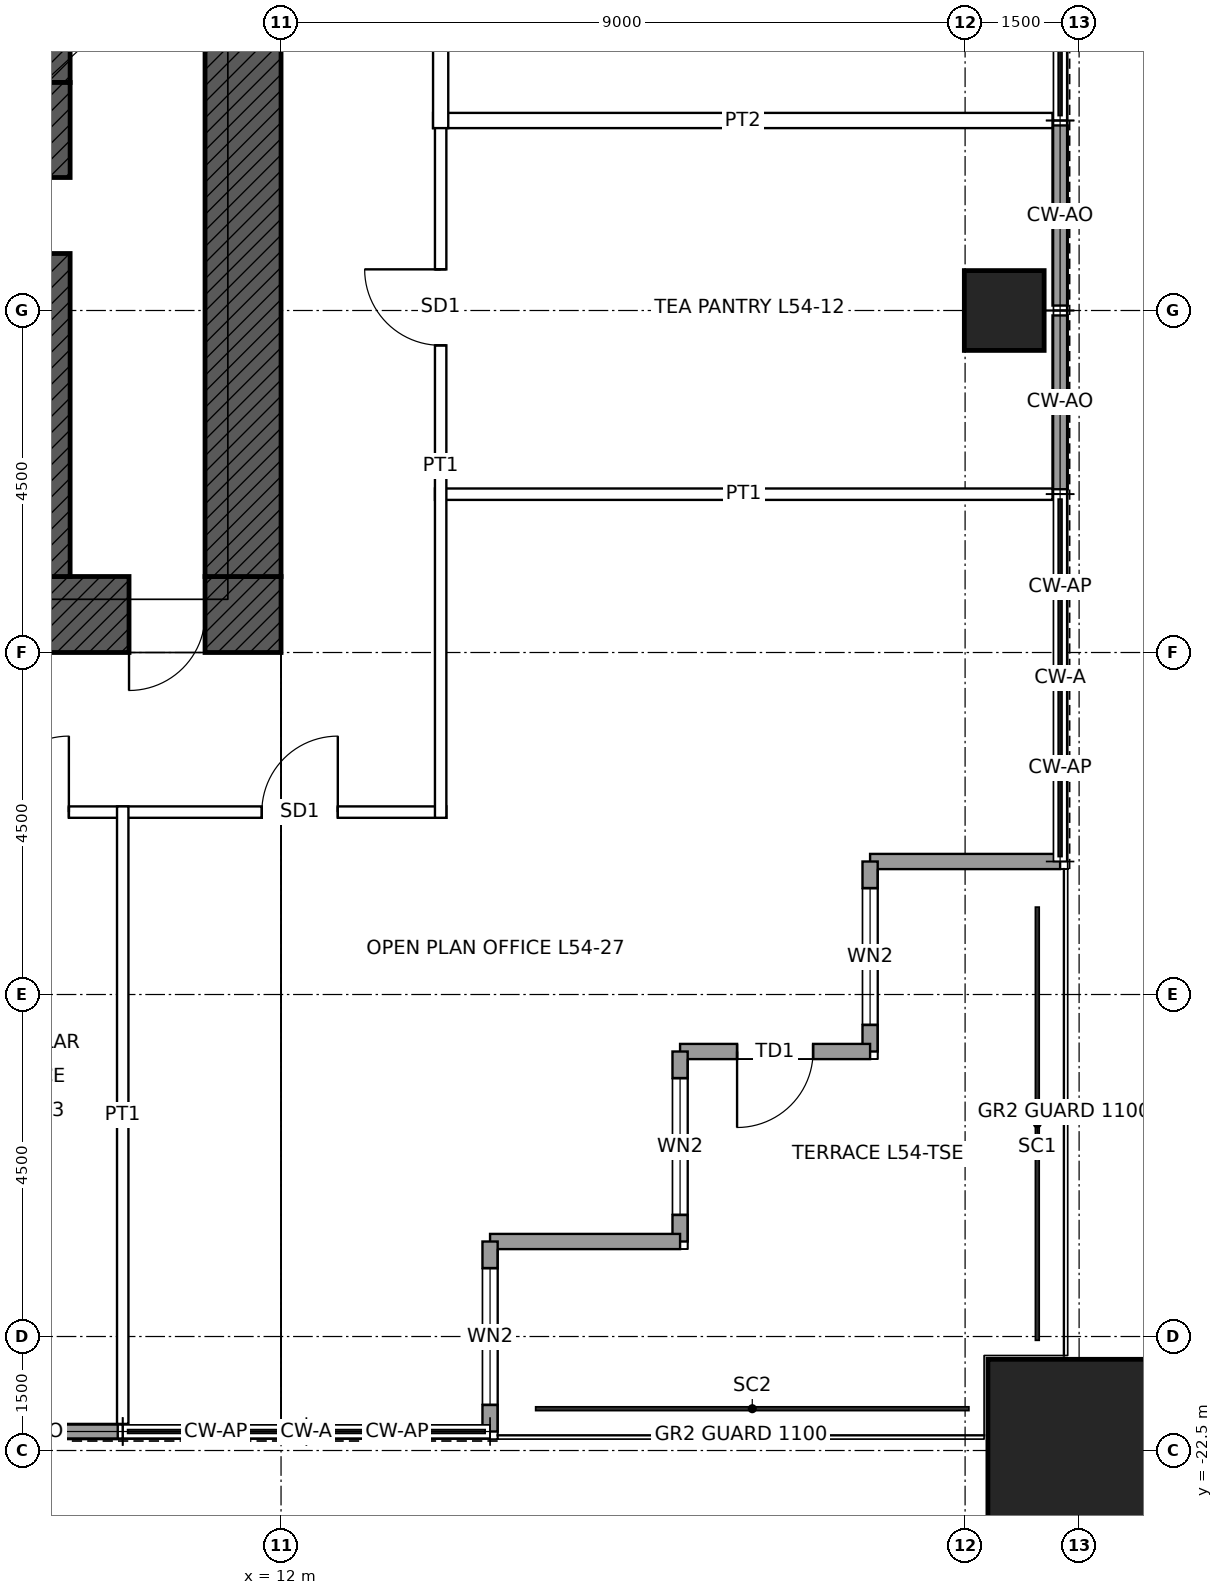
"""IFC4 building model, lengths in metres.
Left out: names, types, materials, properties, quantities, classifications, styles, units other than length and angle.
Written with IfcOpenShell. Run it as: python <this file> out.ifc"""

import sys

from ifc_helpers import new_model, si_unit, direction, frame, frame_2d, origin, origin_2d, place, context, subcontext, project, spatial, rectangle, hollow_rectangle, extrude, element, fill, save


model = new_model("IFC4")
c1 = context("Model", 3, precision=1e-05, world=origin(), true_north=direction((0.0, 1.0)))
c2 = subcontext(c1, "Body", "Model", "MODEL_VIEW")
j1 = project(units=[si_unit("LENGTHUNIT", "METRE"), si_unit("PLANEANGLEUNIT", "RADIAN")], contexts=[c1])
p1 = place(None, origin())
s1 = spatial("IfcSite", under=j1, at=p1, CompositionType="ELEMENT")
p2 = place(p1, origin())
s2 = spatial("IfcBuilding", under=s1, at=p2, CompositionType="ELEMENT")
p3 = place(p2, frame((0.0, 0.0, 249.9)))
s3 = spatial("IfcBuildingStorey", under=s2, at=p3, CompositionType="ELEMENT", Elevation=249.9)
p4 = place(p3, frame((22.5, -22.5, 0.0), z_axis=(0.0, 0.0, 1.0), x_axis=(1.0, 0.0, 0.0)))
e1 = element("IfcColumn", 1, at=p4, inside=s3, PredefinedType="COLUMN", context=c2, shape_type="SweptSolid", body=[
    extrude(hollow_rectangle(XDim=2.4, YDim=2.4, WallThickness=0.12, at=origin_2d()), origin(), (0.0, 0.0, 1.0), 4.0),
])
p5 = place(p3, frame((21.515, -7.5, 0.0), z_axis=(0.0, 0.0, 1.0), x_axis=(1.0, 0.0, 0.0)))
e2 = element("IfcColumn", 2, at=p5, inside=s3, PredefinedType="COLUMN", context=c2, shape_type="SweptSolid", body=[
    extrude(hollow_rectangle(XDim=1.05, YDim=1.05, WallThickness=0.07, at=origin_2d()), origin(), (0.0, 0.0, 1.0), 4.0),
])
p6 = place(p3, frame((12.0, -11.5, 0.0), z_axis=(0.0, 0.0, 1.0), x_axis=(-1.0, 0.0, 0.0)))
e3 = element("IfcWall", 3, at=p6, inside=s3, PredefinedType="SHEAR", context=c2, shape_type="SweptSolid", body=[
    extrude(rectangle(XDim=24.0, YDim=1.0, at=frame_2d((12.0, 0.0))), origin(), (0.0, 0.0, 1.0), 4.0),
])
p7 = place(p6, frame((11.5, 0.0, 0.0)))
e4 = element("IfcOpeningElement", 4, at=p7, cuts=e3, PredefinedType="OPENING", context=c2, shape_type="SweptSolid", body=[
    extrude(rectangle(XDim=1.0, YDim=2.1, at=frame_2d((0.5, 1.05))), frame((0.0, 0.51, 0.0), z_axis=(0.0, -1.0, 0.0), x_axis=(1.0, 0.0, 0.0)), (0.0, 0.0, 1.0), 1.02),
])
p8 = place(p6, frame((1.0, 0.0, 0.0)))
e5 = element("IfcOpeningElement", 5, at=p8, cuts=e3, PredefinedType="OPENING", context=c2, shape_type="SweptSolid", body=[
    extrude(rectangle(XDim=1.0, YDim=2.4, at=frame_2d((0.5, 1.2))), frame((0.0, 0.51, 0.0), z_axis=(0.0, -1.0, 0.0), x_axis=(1.0, 0.0, 0.0)), (0.0, 0.0, 1.0), 1.02),
])
p9 = place(p3, frame((11.5, 11.0, 0.0), z_axis=(0.0, 0.0, 1.0), x_axis=(0.0, -1.0, 0.0)))
e6 = element("IfcWall", 6, at=p9, inside=s3, PredefinedType="SHEAR", context=c2, shape_type="SweptSolid", body=[
    extrude(rectangle(XDim=22.0, YDim=1.0, at=frame_2d((11.0, 0.0))), origin(), (0.0, 0.0, 1.0), 4.0),
])
p10 = place(p9, frame((10.5, 0.0, 0.0)))
e7 = element("IfcOpeningElement", 7, at=p10, cuts=e6, PredefinedType="OPENING", context=c2, shape_type="SweptSolid", body=[
    extrude(rectangle(XDim=1.0, YDim=2.4, at=frame_2d((0.5, 1.2))), frame((0.0, 0.51, 0.0), z_axis=(0.0, -1.0, 0.0), x_axis=(1.0, 0.0, 0.0)), (0.0, 0.0, 1.0), 1.02),
])
p11 = place(p3, frame((-9.0, -4.5, 0.0), z_axis=(0.0, 0.0, 1.0), x_axis=(1.0, 0.0, 0.0)))
e8 = element("IfcWall", 8, at=p11, inside=s3, PredefinedType="SHEAR", context=c2, shape_type="SweptSolid", body=[
    extrude(rectangle(XDim=18.0, YDim=0.45, at=frame_2d((9.0, 0.0))), origin(), (0.0, 0.0, 1.0), 4.0),
])
p12 = place(p3, frame((9.0, -4.5, 0.0), z_axis=(0.0, 0.0, 1.0), x_axis=(0.0, 1.0, 0.0)))
e9 = element("IfcWall", 9, at=p12, inside=s3, PredefinedType="SHEAR", context=c2, shape_type="SweptSolid", body=[
    extrude(rectangle(XDim=3.0, YDim=0.45, at=frame_2d((1.5, 0.0))), origin(), (0.0, 0.0, 1.0), 4.0),
])
p13 = place(p3, frame((9.0, -11.0, 0.0), z_axis=(0.0, 0.0, 1.0), x_axis=(0.0, 1.0, 0.0)))
e10 = element("IfcWall", 10, at=p13, inside=s3, PredefinedType="SHEAR", context=c2, shape_type="SweptSolid", body=[
    extrude(rectangle(XDim=6.5, YDim=0.45, at=frame_2d((3.25, 0.0))), origin(), (0.0, 0.0, 1.0), 4.0),
])
p14 = place(p13, frame((4.25, 0.0, 0.0)))
e11 = element("IfcOpeningElement", 11, at=p14, cuts=e10, PredefinedType="OPENING", context=c2, shape_type="SweptSolid", body=[
    extrude(rectangle(XDim=1.0, YDim=2.1, at=frame_2d((0.5, 1.05))), frame((0.0, 0.235, 0.0), z_axis=(0.0, -1.0, 0.0), x_axis=(1.0, 0.0, 0.0)), (0.0, 0.0, 1.0), 0.47),
])
p15 = place(p3, frame((22.25, -14.75, 0.0), z_axis=(0.0, 0.0, 1.0), x_axis=(-1.0, 0.0, 0.0)))
e12 = element("IfcWall", 12, at=p15, inside=s3, PredefinedType="SOLIDWALL", context=c2, shape_type="SweptSolid", body=[
    extrude(rectangle(XDim=2.5, YDim=0.2, at=frame_2d((1.25, 0.0))), origin(), (0.0, 0.0, 1.0), 3.75),
])
p16 = place(p3, frame((19.75, -14.75, 0.0), z_axis=(0.0, 0.0, 1.0), x_axis=(0.0, -1.0, 0.0)))
e13 = element("IfcWall", 13, at=p16, inside=s3, PredefinedType="SOLIDWALL", context=c2, shape_type="SweptSolid", body=[
    extrude(rectangle(XDim=2.5, YDim=0.2, at=frame_2d((1.25, 0.0))), origin(), (0.0, 0.0, 1.0), 3.75),
])
p17 = place(p16, frame((0.35, 0.0, 0.3)))
e14 = element("IfcOpeningElement", 14, at=p17, cuts=e13, PredefinedType="OPENING", context=c2, shape_type="SweptSolid", body=[
    extrude(rectangle(XDim=1.8, YDim=2.4, at=frame_2d((0.9, 1.2))), frame((0.0, 0.11, 0.0), z_axis=(0.0, -1.0, 0.0), x_axis=(1.0, 0.0, 0.0)), (0.0, 0.0, 1.0), 0.22),
])
p18 = place(p3, frame((19.75, -17.25, 0.0), z_axis=(0.0, 0.0, 1.0), x_axis=(-1.0, 0.0, 0.0)))
e15 = element("IfcWall", 15, at=p18, inside=s3, PredefinedType="SOLIDWALL", context=c2, shape_type="SweptSolid", body=[
    extrude(rectangle(XDim=2.5, YDim=0.2, at=frame_2d((1.25, 0.0))), origin(), (0.0, 0.0, 1.0), 3.75),
])
p19 = place(p18, frame((0.75, 0.0, 0.0)))
e16 = element("IfcOpeningElement", 16, at=p19, cuts=e15, PredefinedType="OPENING", context=c2, shape_type="SweptSolid", body=[
    extrude(rectangle(XDim=1.0, YDim=2.4, at=frame_2d((0.5, 1.2))), frame((0.0, 0.11, 0.0), z_axis=(0.0, -1.0, 0.0), x_axis=(1.0, 0.0, 0.0)), (0.0, 0.0, 1.0), 0.22),
])
p20 = place(p3, frame((17.25, -17.25, 0.0), z_axis=(0.0, 0.0, 1.0), x_axis=(0.0, -1.0, 0.0)))
e17 = element("IfcWall", 17, at=p20, inside=s3, PredefinedType="SOLIDWALL", context=c2, shape_type="SweptSolid", body=[
    extrude(rectangle(XDim=2.5, YDim=0.2, at=frame_2d((1.25, 0.0))), origin(), (0.0, 0.0, 1.0), 3.75),
])
p21 = place(p20, frame((0.35, 0.0, 0.3)))
e18 = element("IfcOpeningElement", 18, at=p21, cuts=e17, PredefinedType="OPENING", context=c2, shape_type="SweptSolid", body=[
    extrude(rectangle(XDim=1.8, YDim=2.4, at=frame_2d((0.9, 1.2))), frame((0.0, 0.11, 0.0), z_axis=(0.0, -1.0, 0.0), x_axis=(1.0, 0.0, 0.0)), (0.0, 0.0, 1.0), 0.22),
])
p22 = place(p3, frame((17.25, -19.75, 0.0), z_axis=(0.0, 0.0, 1.0), x_axis=(-1.0, 0.0, 0.0)))
e19 = element("IfcWall", 19, at=p22, inside=s3, PredefinedType="SOLIDWALL", context=c2, shape_type="SweptSolid", body=[
    extrude(rectangle(XDim=2.5, YDim=0.2, at=frame_2d((1.25, 0.0))), origin(), (0.0, 0.0, 1.0), 3.75),
])
p23 = place(p3, frame((14.75, -19.75, 0.0), z_axis=(0.0, 0.0, 1.0), x_axis=(0.0, -1.0, 0.0)))
e20 = element("IfcWall", 20, at=p23, inside=s3, PredefinedType="SOLIDWALL", context=c2, shape_type="SweptSolid", body=[
    extrude(rectangle(XDim=2.5, YDim=0.2, at=frame_2d((1.25, 0.0))), origin(), (0.0, 0.0, 1.0), 3.75),
])
p24 = place(p23, frame((0.35, 0.0, 0.3)))
e21 = element("IfcOpeningElement", 21, at=p24, cuts=e20, PredefinedType="OPENING", context=c2, shape_type="SweptSolid", body=[
    extrude(rectangle(XDim=1.8, YDim=2.4, at=frame_2d((0.9, 1.2))), frame((0.0, 0.11, 0.0), z_axis=(0.0, -1.0, 0.0), x_axis=(1.0, 0.0, 0.0)), (0.0, 0.0, 1.0), 0.22),
])
p25 = place(p3, frame((22.25, -5.065, 0.0), z_axis=(0.0, 0.0, 1.0), x_axis=(0.0, -1.0, 0.0)))
e22 = element("IfcWall", 22, at=p25, inside=s3, PredefinedType="SOLIDWALL", context=c2, shape_type="SweptSolid", body=[
    extrude(rectangle(XDim=2.37, YDim=0.2, at=frame_2d((1.185, 0.0))), origin(), (0.0, 0.0, 1.0), 3.75),
])
for number, where, z_axis, x_axis in (
    (23, (22.25, -7.565, 0.0), (0.0, 0.0, 1.0), (0.0, -1.0, 0.0)),
    (24, (9.852, -22.25, 0.0), (0.0, 0.0, 1.0), (-1.0, 0.0, 0.0)),
):
    element("IfcWall", number, at=place(p3, frame(where, z_axis=z_axis, x_axis=x_axis)), inside=s3, PredefinedType="SOLIDWALL", context=c2, shape_type="SweptSolid", body=[
        extrude(rectangle(XDim=2.287, YDim=0.2, at=frame_2d((1.144, 0.0))), origin(), (0.0, 0.0, 1.0), 3.75),
    ])
p26 = place(p3, frame((-14.175, -14.1, 0.0), z_axis=(0.0, 0.0, 1.0), x_axis=(1.0, 0.0, 0.0)))
e25 = element("IfcWall", 25, at=p26, inside=s3, PredefinedType="PARTITIONING", context=c2, shape_type="SweptSolid", body=[
    extrude(rectangle(XDim=28.35, YDim=0.15, at=frame_2d((14.175, 0.0))), origin(), (0.0, 0.0, 1.0), 3.75),
])
p27 = place(p26, frame((22.384, 0.0, 0.0)))
e26 = element("IfcOpeningElement", 26, at=p27, cuts=e25, PredefinedType="OPENING", context=c2, shape_type="SweptSolid", body=[
    extrude(rectangle(XDim=1.0, YDim=2.4, at=frame_2d((0.5, 1.2))), frame((0.0, 0.085, 0.0), z_axis=(0.0, -1.0, 0.0), x_axis=(1.0, 0.0, 0.0)), (0.0, 0.0, 1.0), 0.17),
])
p28 = place(p26, frame((19.925, 0.0, 0.0)))
e27 = element("IfcOpeningElement", 27, at=p28, cuts=e25, PredefinedType="OPENING", context=c2, shape_type="SweptSolid", body=[
    extrude(rectangle(XDim=1.0, YDim=2.4, at=frame_2d((0.5, 1.2))), frame((0.0, 0.085, 0.0), z_axis=(0.0, -1.0, 0.0), x_axis=(1.0, 0.0, 0.0)), (0.0, 0.0, 1.0), 0.17),
])
p29 = place(p26, frame((17.425, 0.0, 0.0)))
e28 = element("IfcOpeningElement", 28, at=p29, cuts=e25, PredefinedType="OPENING", context=c2, shape_type="SweptSolid", body=[
    extrude(rectangle(XDim=1.0, YDim=2.4, at=frame_2d((0.5, 1.2))), frame((0.0, 0.085, 0.0), z_axis=(0.0, -1.0, 0.0), x_axis=(1.0, 0.0, 0.0)), (0.0, 0.0, 1.0), 0.17),
])
p30 = place(p26, frame((15.275, 0.0, 0.0)))
e29 = element("IfcOpeningElement", 29, at=p30, cuts=e25, PredefinedType="OPENING", context=c2, shape_type="SweptSolid", body=[
    extrude(rectangle(XDim=1.0, YDim=2.4, at=frame_2d((0.5, 1.2))), frame((0.0, 0.085, 0.0), z_axis=(0.0, -1.0, 0.0), x_axis=(1.0, 0.0, 0.0)), (0.0, 0.0, 1.0), 0.17),
])
p31 = place(p26, frame((11.175, 0.0, 0.0)))
e30 = element("IfcOpeningElement", 30, at=p31, cuts=e25, PredefinedType="OPENING", context=c2, shape_type="SweptSolid", body=[
    extrude(rectangle(XDim=1.0, YDim=2.4, at=frame_2d((0.5, 1.2))), frame((0.0, 0.085, 0.0), z_axis=(0.0, -1.0, 0.0), x_axis=(1.0, 0.0, 0.0)), (0.0, 0.0, 1.0), 0.17),
])
p32 = place(p26, frame((7.425, 0.0, 0.0)))
e31 = element("IfcOpeningElement", 31, at=p32, cuts=e25, PredefinedType="OPENING", context=c2, shape_type="SweptSolid", body=[
    extrude(rectangle(XDim=1.0, YDim=2.4, at=frame_2d((0.5, 1.2))), frame((0.0, 0.085, 0.0), z_axis=(0.0, -1.0, 0.0), x_axis=(1.0, 0.0, 0.0)), (0.0, 0.0, 1.0), 0.17),
])
p33 = place(p26, frame((4.967, 0.0, 0.0)))
e32 = element("IfcOpeningElement", 32, at=p33, cuts=e25, PredefinedType="OPENING", context=c2, shape_type="SweptSolid", body=[
    extrude(rectangle(XDim=1.0, YDim=2.4, at=frame_2d((0.5, 1.2))), frame((0.0, 0.085, 0.0), z_axis=(0.0, -1.0, 0.0), x_axis=(1.0, 0.0, 0.0)), (0.0, 0.0, 1.0), 0.17),
])
p34 = place(p26, frame((25.922, 0.0, 0.0)))
e33 = element("IfcOpeningElement", 33, at=p34, cuts=e25, PredefinedType="OPENING", context=c2, shape_type="SweptSolid", body=[
    extrude(rectangle(XDim=1.0, YDim=2.4, at=frame_2d((0.5, 1.2))), frame((0.0, 0.085, 0.0), z_axis=(0.0, -1.0, 0.0), x_axis=(1.0, 0.0, 0.0)), (0.0, 0.0, 1.0), 0.17),
])
p35 = place(p26, frame((1.667, 0.0, 0.0)))
e34 = element("IfcOpeningElement", 34, at=p35, cuts=e25, PredefinedType="OPENING", context=c2, shape_type="SweptSolid", body=[
    extrude(rectangle(XDim=1.0, YDim=2.4, at=frame_2d((0.5, 1.2))), frame((0.0, 0.085, 0.0), z_axis=(0.0, -1.0, 0.0), x_axis=(1.0, 0.0, 0.0)), (0.0, 0.0, 1.0), 0.17),
])
p36 = place(p3, frame((14.025, -9.917, 0.0), z_axis=(0.0, 0.0, 1.0), x_axis=(1.0, 0.0, 0.0)))
e35 = element("IfcWall", 35, at=p36, inside=s3, PredefinedType="PARTITIONING", context=c2, shape_type="SweptSolid", body=[
    extrude(rectangle(XDim=8.125, YDim=0.15, at=frame_2d((4.062, 0.0))), origin(), (0.0, 0.0, 1.0), 3.75),
])
p37 = place(p3, frame((14.0, -5.0, 0.0), z_axis=(0.0, 0.0, 1.0), x_axis=(1.0, 0.0, 0.0)))
e36 = element("IfcWall", 36, at=p37, inside=s3, PredefinedType="PARTITIONING", context=c2, shape_type="SweptSolid", body=[
    extrude(rectangle(XDim=8.15, YDim=0.2, at=frame_2d((4.075, 0.0))), origin(), (0.0, 0.0, 1.0), 3.75),
])
p38 = place(p3, frame((9.917, -22.15, 0.0), z_axis=(0.0, 0.0, 1.0), x_axis=(0.0, 1.0, 0.0)))
e37 = element("IfcWall", 37, at=p38, inside=s3, PredefinedType="PARTITIONING", context=c2, shape_type="SweptSolid", body=[
    extrude(rectangle(XDim=8.125, YDim=0.15, at=frame_2d((4.062, 0.0))), origin(), (0.0, 0.0, 1.0), 3.75),
])
p39 = place(p3, frame((14.1, -14.175, 0.0), z_axis=(0.0, 0.0, 1.0), x_axis=(0.0, 1.0, 0.0)))
e38 = element("IfcWall", 38, at=p39, inside=s3, PredefinedType="PARTITIONING", context=c2, shape_type="SweptSolid", body=[
    extrude(rectangle(XDim=9.25, YDim=0.15, at=frame_2d((4.625, 0.0))), origin(), (0.0, 0.0, 1.0), 3.75),
])
p40 = place(p39, frame((6.217, 0.0, 0.0)))
e39 = element("IfcOpeningElement", 39, at=p40, cuts=e38, PredefinedType="OPENING", context=c2, shape_type="SweptSolid", body=[
    extrude(rectangle(XDim=1.0, YDim=2.4, at=frame_2d((0.5, 1.2))), frame((0.0, 0.085, 0.0), z_axis=(0.0, -1.0, 0.0), x_axis=(1.0, 0.0, 0.0)), (0.0, 0.0, 1.0), 0.17),
])
p41 = place(p3, frame((14.1, -5.1, 0.0), z_axis=(0.0, 0.0, 1.0), x_axis=(0.0, 1.0, 0.0)))
e40 = element("IfcWall", 40, at=p41, inside=s3, PredefinedType="PARTITIONING", context=c2, shape_type="SweptSolid", body=[
    extrude(rectangle(XDim=15.117, YDim=0.2, at=frame_2d((7.559, 0.0))), origin(), (0.0, 0.0, 1.0), 3.75),
])
p42 = place(p41, frame((12.059, 0.0, 0.0)))
e41 = element("IfcOpeningElement", 41, at=p42, cuts=e40, PredefinedType="OPENING", context=c2, shape_type="SweptSolid", body=[
    extrude(rectangle(XDim=1.0, YDim=2.4, at=frame_2d((0.5, 1.2))), frame((0.0, 0.11, 0.0), z_axis=(0.0, -1.0, 0.0), x_axis=(1.0, 0.0, 0.0)), (0.0, 0.0, 1.0), 0.22),
])
p43 = place(p41, frame((7.1, 0.0, 0.0)))
e42 = element("IfcOpeningElement", 42, at=p43, cuts=e40, PredefinedType="OPENING", context=c2, shape_type="SweptSolid", body=[
    extrude(rectangle(XDim=1.0, YDim=2.4, at=frame_2d((0.5, 1.2))), frame((0.0, 0.11, 0.0), z_axis=(0.0, -1.0, 0.0), x_axis=(1.0, 0.0, 0.0)), (0.0, 0.0, 1.0), 0.22),
])
p44 = place(p41, frame((2.1, 0.0, 0.0)))
e43 = element("IfcOpeningElement", 43, at=p44, cuts=e40, PredefinedType="OPENING", context=c2, shape_type="SweptSolid", body=[
    extrude(rectangle(XDim=1.0, YDim=2.4, at=frame_2d((0.5, 1.2))), frame((0.0, 0.11, 0.0), z_axis=(0.0, -1.0, 0.0), x_axis=(1.0, 0.0, 0.0)), (0.0, 0.0, 1.0), 0.22),
])
p45 = place(p17, origin())
e44 = element("IfcWindow", 44, at=p45, inside=s3, PartitioningType="SINGLE_PANEL", PredefinedType="WINDOW", context=c2, shape_type="SweptSolid", body=[
    extrude(rectangle(XDim=1.8, YDim=2.4, at=frame_2d((0.9, 1.2))), frame((0.0, 0.03, 0.0), z_axis=(0.0, -1.0, 0.0), x_axis=(1.0, 0.0, 0.0)), (0.0, 0.0, 1.0), 0.06),
])
fill(e14, e44)
p46 = place(p19, origin())
e45 = element("IfcDoor", 45, at=p46, inside=s3, OperationType="SINGLE_SWING_RIGHT", PredefinedType="DOOR", context=c2, shape_type="SweptSolid", body=[
    extrude(rectangle(XDim=1.0, YDim=2.4, at=frame_2d((0.5, 1.2))), frame((0.0, 0.025, 0.0), z_axis=(0.0, -1.0, 0.0), x_axis=(1.0, 0.0, 0.0)), (0.0, 0.0, 1.0), 0.05),
])
fill(e16, e45)
p47 = place(p21, origin())
e46 = element("IfcWindow", 46, at=p47, inside=s3, PartitioningType="SINGLE_PANEL", PredefinedType="WINDOW", context=c2, shape_type="SweptSolid", body=[
    extrude(rectangle(XDim=1.8, YDim=2.4, at=frame_2d((0.9, 1.2))), frame((0.0, 0.03, 0.0), z_axis=(0.0, -1.0, 0.0), x_axis=(1.0, 0.0, 0.0)), (0.0, 0.0, 1.0), 0.06),
])
fill(e18, e46)
p48 = place(p24, origin())
e47 = element("IfcWindow", 47, at=p48, inside=s3, PartitioningType="SINGLE_PANEL", PredefinedType="WINDOW", context=c2, shape_type="SweptSolid", body=[
    extrude(rectangle(XDim=1.8, YDim=2.4, at=frame_2d((0.9, 1.2))), frame((0.0, 0.03, 0.0), z_axis=(0.0, -1.0, 0.0), x_axis=(1.0, 0.0, 0.0)), (0.0, 0.0, 1.0), 0.06),
])
fill(e21, e47)
p49 = place(p8, origin())
e48 = element("IfcDoor", 48, at=p49, inside=s3, OperationType="SINGLE_SWING_RIGHT", PredefinedType="DOOR", context=c2, shape_type="SweptSolid", body=[
    extrude(rectangle(XDim=1.0, YDim=2.4, at=frame_2d((0.5, 1.2))), frame((0.0, 0.485, 0.0), z_axis=(0.0, -1.0, 0.0), x_axis=(1.0, 0.0, 0.0)), (0.0, 0.0, 1.0), 0.05),
])
fill(e5, e48)
p50 = place(p14, origin())
e49 = element("IfcDoor", 49, at=p50, inside=s3, OperationType="SINGLE_SWING_LEFT", PredefinedType="DOOR", context=c2, shape_type="SweptSolid", body=[
    extrude(rectangle(XDim=1.0, YDim=2.1, at=frame_2d((0.5, 1.05))), frame((0.0, 0.025, 0.0), z_axis=(0.0, -1.0, 0.0), x_axis=(1.0, 0.0, 0.0)), (0.0, 0.0, 1.0), 0.05),
])
fill(e11, e49)
p51 = place(p40, origin())
e50 = element("IfcDoor", 50, at=p51, inside=s3, OperationType="SINGLE_SWING_RIGHT", PredefinedType="DOOR", context=c2, shape_type="SweptSolid", body=[
    extrude(rectangle(XDim=1.0, YDim=2.4, at=frame_2d((0.5, 1.2))), frame((0.0, 0.025, 0.0), z_axis=(0.0, -1.0, 0.0), x_axis=(1.0, 0.0, 0.0)), (0.0, 0.0, 1.0), 0.05),
])
fill(e39, e50)
p52 = place(p27, origin())
e51 = element("IfcDoor", 51, at=p52, inside=s3, OperationType="SINGLE_SWING_RIGHT", PredefinedType="DOOR", context=c2, shape_type="SweptSolid", body=[
    extrude(rectangle(XDim=1.0, YDim=2.4, at=frame_2d((0.5, 1.2))), frame((0.0, 0.025, 0.0), z_axis=(0.0, -1.0, 0.0), x_axis=(1.0, 0.0, 0.0)), (0.0, 0.0, 1.0), 0.05),
])
fill(e26, e51)
p53 = place(p34, origin())
e52 = element("IfcDoor", 52, at=p53, inside=s3, OperationType="SINGLE_SWING_RIGHT", PredefinedType="DOOR", context=c2, shape_type="SweptSolid", body=[
    extrude(rectangle(XDim=1.0, YDim=2.4, at=frame_2d((0.5, 1.2))), frame((0.0, 0.025, 0.0), z_axis=(0.0, -1.0, 0.0), x_axis=(1.0, 0.0, 0.0)), (0.0, 0.0, 1.0), 0.05),
])
fill(e33, e52)
save(model, sys.argv[1])
